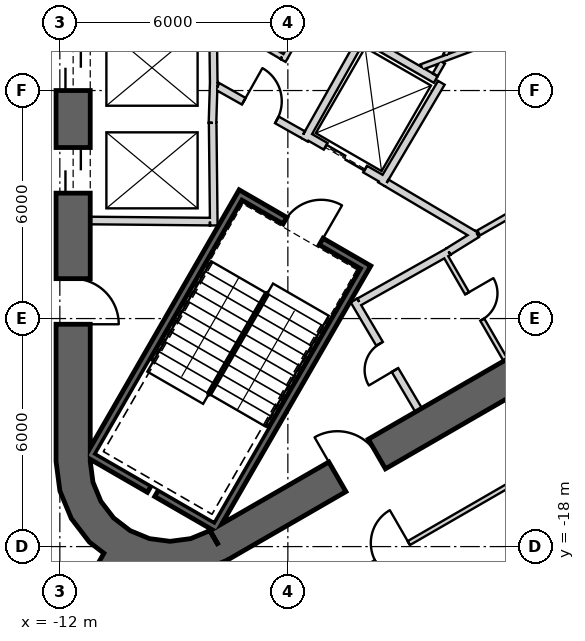
"""IFC4 building model, lengths in metres.
Left out: names, types, materials, properties, quantities, classifications, styles, units other than length and angle.
Written with IfcOpenShell. Run it as: python <this file> out.ifc"""

import sys

from ifc_helpers import new_model, si_unit, direction, frame, frame_2d, origin, place, context, subcontext, project, spatial, polyline, rectangle, outline, extrude, element, fill, save


model = new_model("IFC4")
c1 = context("Model", 3, precision=1e-05, world=origin(), true_north=direction((0.0, 1.0)))
c2 = subcontext(c1, "Body", "Model", "MODEL_VIEW")
j1 = project(units=[si_unit("LENGTHUNIT", "METRE"), si_unit("PLANEANGLEUNIT", "RADIAN")], contexts=[c1])
p1 = place(None, origin())
s1 = spatial("IfcSite", under=j1, at=p1, CompositionType="ELEMENT")
p2 = place(p1, origin())
s2 = spatial("IfcBuilding", under=s1, at=p2, CompositionType="ELEMENT")
p3 = place(p2, frame((0.0, 0.0, 357.2)))
s3 = spatial("IfcBuildingStorey", under=s2, at=p3, CompositionType="ELEMENT", Elevation=357.2)
p4 = place(p3, frame((-11.65, 15.762, 0.0), z_axis=(0.0, 0.0, 1.0), x_axis=(0.0, -1.0, 0.0)))
e1 = element("IfcWall", 1, at=p4, inside=s3, PredefinedType="SHEAR", context=c2, shape_type="SweptSolid", body=[
    extrude(rectangle(XDim=31.523, YDim=0.9, at=frame_2d((15.762, 0.0))), origin(), (0.0, 0.0, 1.0), 3.9),
])
p5 = place(p4, frame((7.062, 0.0, 0.0)))
e2 = element("IfcOpeningElement", 2, at=p5, cuts=e1, PredefinedType="OPENING", context=c2, shape_type="SweptSolid", body=[
    extrude(rectangle(XDim=1.2, YDim=2.4, at=frame_2d((0.6, 1.2))), frame((0.0, 0.46, 0.0), z_axis=(0.0, -1.0, 0.0), x_axis=(1.0, 0.0, 0.0)), (0.0, 0.0, 1.0), 0.92),
])
p6 = place(p4, frame((9.762, 0.0, 0.0)))
e3 = element("IfcOpeningElement", 3, at=p6, cuts=e1, PredefinedType="OPENING", context=c2, shape_type="SweptSolid", body=[
    extrude(rectangle(XDim=1.2, YDim=2.4, at=frame_2d((0.6, 1.2))), frame((0.0, 0.46, 0.0), z_axis=(0.0, -1.0, 0.0), x_axis=(1.0, 0.0, 0.0)), (0.0, 0.0, 1.0), 0.92),
])
p7 = place(p4, frame((12.462, 0.0, 0.0)))
e4 = element("IfcOpeningElement", 4, at=p7, cuts=e1, PredefinedType="OPENING", context=c2, shape_type="SweptSolid", body=[
    extrude(rectangle(XDim=1.2, YDim=2.4, at=frame_2d((0.6, 1.2))), frame((0.0, 0.46, 0.0), z_axis=(0.0, -1.0, 0.0), x_axis=(1.0, 0.0, 0.0)), (0.0, 0.0, 1.0), 0.92),
])
p8 = place(p4, frame((15.162, 0.0, 0.0)))
e5 = element("IfcOpeningElement", 5, at=p8, cuts=e1, PredefinedType="OPENING", context=c2, shape_type="SweptSolid", body=[
    extrude(rectangle(XDim=1.2, YDim=2.4, at=frame_2d((0.6, 1.2))), frame((0.0, 0.46, 0.0), z_axis=(0.0, -1.0, 0.0), x_axis=(1.0, 0.0, 0.0)), (0.0, 0.0, 1.0), 0.92),
])
p9 = place(p4, frame((17.862, 0.0, 0.0)))
e6 = element("IfcOpeningElement", 6, at=p9, cuts=e1, PredefinedType="OPENING", context=c2, shape_type="SweptSolid", body=[
    extrude(rectangle(XDim=1.2, YDim=2.4, at=frame_2d((0.6, 1.2))), frame((0.0, 0.46, 0.0), z_axis=(0.0, -1.0, 0.0), x_axis=(1.0, 0.0, 0.0)), (0.0, 0.0, 1.0), 0.92),
])
p10 = place(p4, frame((20.562, 0.0, 0.0)))
e7 = element("IfcOpeningElement", 7, at=p10, cuts=e1, PredefinedType="OPENING", context=c2, shape_type="SweptSolid", body=[
    extrude(rectangle(XDim=1.2, YDim=2.4, at=frame_2d((0.6, 1.2))), frame((0.0, 0.46, 0.0), z_axis=(0.0, -1.0, 0.0), x_axis=(1.0, 0.0, 0.0)), (0.0, 0.0, 1.0), 0.92),
])
p11 = place(p4, frame((23.262, 0.0, 0.0)))
e8 = element("IfcOpeningElement", 8, at=p11, cuts=e1, PredefinedType="OPENING", context=c2, shape_type="SweptSolid", body=[
    extrude(rectangle(XDim=1.2, YDim=2.4, at=frame_2d((0.6, 1.2))), frame((0.0, 0.46, 0.0), z_axis=(0.0, -1.0, 0.0), x_axis=(1.0, 0.0, 0.0)), (0.0, 0.0, 1.0), 0.92),
])
p12 = place(p4, frame((3.612, 0.0, 0.0)))
e9 = element("IfcOpeningElement", 9, at=p12, cuts=e1, PredefinedType="OPENING", context=c2, shape_type="SweptSolid", body=[
    extrude(rectangle(XDim=1.2, YDim=2.4, at=frame_2d((0.6, 1.2))), frame((0.0, 0.46, 0.0), z_axis=(0.0, -1.0, 0.0), x_axis=(1.0, 0.0, 0.0)), (0.0, 0.0, 1.0), 0.92),
])
p13 = place(p4, frame((26.712, 0.0, 0.0)))
e10 = element("IfcOpeningElement", 10, at=p13, cuts=e1, PredefinedType="OPENING", context=c2, shape_type="SweptSolid", body=[
    extrude(rectangle(XDim=1.2, YDim=2.4, at=frame_2d((0.6, 1.2))), frame((0.0, 0.46, 0.0), z_axis=(0.0, -1.0, 0.0), x_axis=(1.0, 0.0, 0.0)), (0.0, 0.0, 1.0), 0.92),
])
p14 = place(p3, frame((-7.825, -17.97, 0.0), z_axis=(0.0, 0.0, 1.0), x_axis=(0.866028369851, 0.499994862586, 0.0)))
e11 = element("IfcWall", 11, at=p14, inside=s3, PredefinedType="SHEAR", context=c2, shape_type="SweptSolid", body=[
    extrude(rectangle(XDim=31.523, YDim=0.9, at=frame_2d((15.762, 0.0))), origin(), (0.0, 0.0, 1.0), 3.9),
])
p15 = place(p14, frame((17.862, 0.0, 0.0)))
e12 = element("IfcOpeningElement", 12, at=p15, cuts=e11, PredefinedType="OPENING", context=c2, shape_type="SweptSolid", body=[
    extrude(rectangle(XDim=1.2, YDim=2.4, at=frame_2d((0.6, 1.2))), frame((0.0, 0.46, 0.0), z_axis=(0.0, -1.0, 0.0), x_axis=(1.0, 0.0, 0.0)), (0.0, 0.0, 1.0), 0.92),
])
p16 = place(p14, frame((20.562, 0.0, 0.0)))
e13 = element("IfcOpeningElement", 13, at=p16, cuts=e11, PredefinedType="OPENING", context=c2, shape_type="SweptSolid", body=[
    extrude(rectangle(XDim=1.2, YDim=2.4, at=frame_2d((0.6, 1.2))), frame((0.0, 0.46, 0.0), z_axis=(0.0, -1.0, 0.0), x_axis=(1.0, 0.0, 0.0)), (0.0, 0.0, 1.0), 0.92),
])
p17 = place(p14, frame((26.712, 0.0, 0.0)))
e14 = element("IfcOpeningElement", 14, at=p17, cuts=e11, PredefinedType="OPENING", context=c2, shape_type="SweptSolid", body=[
    extrude(rectangle(XDim=1.2, YDim=2.4, at=frame_2d((0.6, 1.2))), frame((0.0, 0.46, 0.0), z_axis=(0.0, -1.0, 0.0), x_axis=(1.0, 0.0, 0.0)), (0.0, 0.0, 1.0), 0.92),
])
p18 = place(p14, frame((3.612, 0.0, 0.0)))
e15 = element("IfcOpeningElement", 15, at=p18, cuts=e11, PredefinedType="OPENING", context=c2, shape_type="SweptSolid", body=[
    extrude(rectangle(XDim=1.2, YDim=2.4, at=frame_2d((0.6, 1.2))), frame((0.0, 0.46, 0.0), z_axis=(0.0, -1.0, 0.0), x_axis=(1.0, 0.0, 0.0)), (0.0, 0.0, 1.0), 0.92),
])
p19 = place(p3, origin())
e16 = element("IfcWall", 16, at=p19, inside=s3, PredefinedType="SHEAR", context=c2, shape_type="SweptSolid", body=[
    extrude(outline(polyline([(-12.1, -15.762), (-11.998, -16.538), (-11.698, -17.262), (-11.221, -17.883), (-10.6, -18.36), (-9.876, -18.659), (-9.1, -18.762), (-8.323, -18.659), (-7.6, -18.36), (-8.05, -17.58), (-8.556, -17.79), (-9.1, -17.862), (-9.644, -17.79), (-10.15, -17.58), (-10.585, -17.247), (-10.919, -16.812), (-11.128, -16.305), (-11.2, -15.762), (-12.1, -15.762)])), origin(), (0.0, 0.0, 1.0), 3.9),
])
p20 = place(p3, frame((-10.575, -18.316, 0.0), z_axis=(0.0, 0.0, 1.0), x_axis=(-0.500009454961, -0.866019944892, 0.0)))
e17 = element("IfcWall", 17, at=p20, inside=s3, PredefinedType="SHEAR", context=c2, shape_type="SweptSolid", body=[
    extrude(rectangle(XDim=7.388, YDim=0.6, at=frame_2d((3.694, 0.0))), origin(), (0.0, 0.0, 1.0), 3.9),
])
p21 = place(p20, frame((1.4, 0.0, 0.0)))
e18 = element("IfcOpeningElement", 18, at=p21, cuts=e17, PredefinedType="OPENING", context=c2, shape_type="SweptSolid", body=[
    extrude(rectangle(XDim=1.4, YDim=2.4, at=frame_2d((0.7, 1.2))), frame((0.0, 0.31, 0.0), z_axis=(0.0, -1.0, 0.0), x_axis=(1.0, 0.0, 0.0)), (0.0, 0.0, 1.0), 0.62),
])
p22 = place(p3, frame((-7.95, -5.772, 0.0), z_axis=(0.0, 0.0, 1.0), x_axis=(-0.030803413295, -0.999525462272, 0.0)))
e19 = element("IfcWall", 19, at=p22, inside=s3, PredefinedType="PLUMBINGWALL", context=c2, shape_type="SweptSolid", body=[
    extrude(rectangle(XDim=1.078, YDim=0.2, at=frame_2d((0.539, 0.0))), origin(), (0.0, 0.0, 1.0), 3.6),
])
p23 = place(p3, frame((-7.971, -4.05, 0.0), z_axis=(0.0, 0.0, 1.0), x_axis=(0.012042535896, -0.999927486035, 0.0)))
e20 = element("IfcWall", 20, at=p23, inside=s3, PredefinedType="PLUMBINGWALL", context=c2, shape_type="SweptSolid", body=[
    extrude(rectangle(XDim=1.845, YDim=0.2, at=frame_2d((0.922, 0.0))), origin(), (0.0, 0.0, 1.0), 3.6),
])
p24 = place(p3, frame((-7.979, -6.85, 0.0), z_axis=(0.0, 0.0, 1.0), x_axis=(0.011121475088, -0.999938154483, 0.0)))
e21 = element("IfcWall", 21, at=p24, inside=s3, PredefinedType="PLUMBINGWALL", context=c2, shape_type="SweptSolid", body=[
    extrude(rectangle(XDim=2.7, YDim=0.2, at=frame_2d((1.35, 0.0))), origin(), (0.0, 0.0, 1.0), 3.6),
])
p25 = place(p3, frame((-8.05, -9.449, 0.0), z_axis=(0.0, 0.0, 1.0), x_axis=(-0.999957467379, 0.009222983926, 0.0)))
e22 = element("IfcWall", 22, at=p25, inside=s3, PredefinedType="PLUMBINGWALL", context=c2, shape_type="SweptSolid", body=[
    extrude(rectangle(XDim=3.15, YDim=0.2, at=frame_2d((1.575, 0.0))), origin(), (0.0, 0.0, 1.0), 3.6),
])
p26 = place(p3, frame((-3.905, -10.563, -0.3), z_axis=(0.0, 0.0, 1.0), x_axis=(-0.500012932018, -0.866017937352, 0.0)))
e23 = element("IfcWall", 23, at=p26, inside=s3, PredefinedType="SHEAR", context=c2, shape_type="SweptSolid", body=[
    extrude(rectangle(XDim=8.1, YDim=0.2, at=frame_2d((4.05, 0.0))), origin(), (0.0, 0.0, 1.0), 3.9),
])
p27 = place(p3, frame((-11.282, -15.541, -0.3), z_axis=(0.0, 0.0, 1.0), x_axis=(0.866000483506, -0.500043160704, 0.0)))
e24 = element("IfcWall", 24, at=p27, inside=s3, PredefinedType="SHEAR", context=c2, shape_type="SweptSolid", body=[
    extrude(rectangle(XDim=3.8, YDim=0.2, at=frame_2d((1.9, 0.0))), origin(), (0.0, 0.0, 1.0), 3.9),
])
p28 = place(p3, frame((-7.196, -8.663, -0.3), z_axis=(0.0, 0.0, 1.0), x_axis=(-0.499997992926, -0.866026562566, 0.0)))
e25 = element("IfcWall", 25, at=p28, inside=s3, PredefinedType="SHEAR", context=c2, shape_type="SweptSolid", body=[
    extrude(rectangle(XDim=7.9, YDim=0.2, at=frame_2d((3.95, 0.0))), origin(), (0.0, 0.0, 1.0), 3.9),
])
p29 = place(p3, frame((-4.041, -10.599, -0.3), z_axis=(0.0, 0.0, 1.0), x_axis=(-0.866047807691, 0.499961193289, 0.0)))
e26 = element("IfcWall", 26, at=p29, inside=s3, PredefinedType="SHEAR", context=c2, shape_type="SweptSolid", body=[
    extrude(rectangle(XDim=3.6, YDim=0.2, at=frame_2d((1.8, 0.0))), origin(), (0.0, 0.0, 1.0), 3.9),
])
p30 = place(p29, frame((1.25, 0.0, 0.3)))
e27 = element("IfcOpeningElement", 27, at=p30, cuts=e26, PredefinedType="OPENING", context=c2, shape_type="SweptSolid", body=[
    extrude(rectangle(XDim=1.1, YDim=2.1, at=frame_2d((0.55, 1.05))), frame((0.0, 0.11, 0.0), z_axis=(0.0, -1.0, 0.0), x_axis=(1.0, 0.0, 0.0)), (0.0, 0.0, 1.0), 0.22),
])
p31 = place(p3, frame((-3.446, -8.368, 0.0), z_axis=(0.0, 0.0, 1.0), x_axis=(-0.866024647952, 0.500001309137, 0.0)))
e28 = element("IfcWall", 28, at=p31, inside=s3, PredefinedType="PLUMBINGWALL", context=c2, shape_type="SweptSolid", body=[
    extrude(rectangle(XDim=2.4, YDim=0.2, at=frame_2d((1.2, 0.0))), origin(), (0.0, 0.0, 1.0), 3.6),
])
p32 = place(p31, frame((0.6, 0.0, 0.0)))
e29 = element("IfcOpeningElement", 29, at=p32, cuts=e28, PredefinedType="OPENING", context=c2, shape_type="SweptSolid", body=[
    extrude(rectangle(XDim=1.2, YDim=2.4, at=frame_2d((0.6, 1.2))), frame((0.0, 0.11, 0.0), z_axis=(0.0, -1.0, 0.0), x_axis=(1.0, 0.0, 0.0)), (0.0, 0.0, 1.0), 0.22),
])
p33 = place(p3, frame((-1.961, -5.796, 0.0), z_axis=(0.0, 0.0, 1.0), x_axis=(-0.508647062354, -0.860975125052, 0.0)))
e30 = element("IfcWall", 30, at=p33, inside=s3, PredefinedType="PLUMBINGWALL", context=c2, shape_type="SweptSolid", body=[
    extrude(rectangle(XDim=3.1, YDim=0.2, at=frame_2d((1.55, 0.0))), origin(), (0.0, 0.0, 1.0), 3.6),
])
p34 = place(p3, frame((-3.99, -4.509, 0.0), z_axis=(0.0, 0.0, 1.0), x_axis=(-0.491358283181, -0.870957540612, 0.0)))
e31 = element("IfcWall", 31, at=p34, inside=s3, PredefinedType="PLUMBINGWALL", context=c2, shape_type="SweptSolid", body=[
    extrude(rectangle(XDim=3.2, YDim=0.2, at=frame_2d((1.6, 0.0))), origin(), (0.0, 0.0, 1.0), 3.6),
])
p35 = place(p3, frame((-3.953, -4.646, 0.0), z_axis=(0.0, 0.0, 1.0), x_axis=(0.866065302921, -0.4999308863, 0.0)))
e32 = element("IfcWall", 32, at=p35, inside=s3, PredefinedType="PLUMBINGWALL", context=c2, shape_type="SweptSolid", body=[
    extrude(rectangle(XDim=2.264, YDim=0.2, at=frame_2d((1.132, 0.0))), origin(), (0.0, 0.0, 1.0), 3.6),
])
p36 = place(p3, frame((-4.26, -11.524, 0.0), z_axis=(0.0, 0.0, 1.0), x_axis=(0.507997497166, -0.861358544901, 0.0)))
e33 = element("IfcWall", 33, at=p36, inside=s3, PredefinedType="PARTITIONING", context=c2, shape_type="SweptSolid", body=[
    extrude(rectangle(XDim=3.35, YDim=0.2, at=frame_2d((1.675, 0.0))), origin(), (0.0, 0.0, 1.0), 3.6),
])
p37 = place(p3, frame((-1.024, -9.771, 0.0), z_axis=(0.0, 0.0, 1.0), x_axis=(-0.866029903013, -0.499992207027, 0.0)))
e34 = element("IfcWall", 34, at=p37, inside=s3, PredefinedType="PARTITIONING", context=c2, shape_type="SweptSolid", body=[
    extrude(rectangle(XDim=3.578, YDim=0.2, at=frame_2d((1.789, 0.0))), origin(), (0.0, 0.0, 1.0), 3.6),
])
p38 = place(p37, frame((1.389, 0.0, 0.0)))
e35 = element("IfcOpeningElement", 35, at=p38, cuts=e34, PredefinedType="OPENING", context=c2, shape_type="SweptSolid", body=[
    extrude(rectangle(XDim=0.8, YDim=2.1, at=frame_2d((0.4, 1.05))), frame((0.0, 0.11, 0.0), z_axis=(0.0, -1.0, 0.0), x_axis=(1.0, 0.0, 0.0)), (0.0, 0.0, 1.0), 0.22),
])
p39 = place(p3, frame((-1.023, -9.772, 0.0), z_axis=(0.0, 0.0, 1.0), x_axis=(0.874290944206, 0.485402250592, 0.0)))
e36 = element("IfcWall", 36, at=p39, inside=s3, PredefinedType="PARTITIONING", context=c2, shape_type="SweptSolid", body=[
    extrude(rectangle(XDim=1.723, YDim=0.12, at=frame_2d((0.861, 0.0))), origin(), (0.0, 0.0, 1.0), 3.6),
])
p40 = place(p3, frame((-3.401, -8.43, 0.0), z_axis=(0.0, 0.0, 1.0), x_axis=(0.860630814782, -0.509229418482, 0.0)))
e37 = element("IfcWall", 37, at=p40, inside=s3, PredefinedType="PARTITIONING", context=c2, shape_type="SweptSolid", body=[
    extrude(rectangle(XDim=2.582, YDim=0.2, at=frame_2d((1.291, 0.0))), origin(), (0.0, 0.0, 1.0), 3.6),
])
p41 = place(p3, frame((-7.849, -5.894, 0.0), z_axis=(0.0, 0.0, 1.0), x_axis=(0.871363259478, -0.490638431059, 0.0)))
e38 = element("IfcWall", 38, at=p41, inside=s3, PredefinedType="PARTITIONING", context=c2, shape_type="SweptSolid", body=[
    extrude(rectangle(XDim=2.581, YDim=0.2, at=frame_2d((1.291, 0.0))), origin(), (0.0, 0.0, 1.0), 3.6),
])
p42 = place(p41, frame((0.791, 0.0, 0.0)))
e39 = element("IfcOpeningElement", 39, at=p42, cuts=e38, PredefinedType="OPENING", context=c2, shape_type="SweptSolid", body=[
    extrude(rectangle(XDim=1.0, YDim=2.1, at=frame_2d((0.5, 1.05))), frame((0.0, 0.11, 0.0), z_axis=(0.0, -1.0, 0.0), x_axis=(1.0, 0.0, 0.0)), (0.0, 0.0, 1.0), 0.22),
])
p43 = place(p3, frame((0.224, -1.761, 0.0), z_axis=(0.0, 0.0, 1.0), x_axis=(-0.494327216836, -0.869275907118, 0.0)))
e40 = element("IfcWall", 40, at=p43, inside=s3, PredefinedType="PARTITIONING", context=c2, shape_type="SweptSolid", body=[
    extrude(rectangle(XDim=4.487, YDim=0.12, at=frame_2d((2.244, 0.0))), origin(), (0.0, 0.0, 1.0), 3.6),
])
p44 = place(p43, frame((1.895, 0.0, 0.0)))
e41 = element("IfcOpeningElement", 41, at=p44, cuts=e40, PredefinedType="OPENING", context=c2, shape_type="SweptSolid", body=[
    extrude(rectangle(XDim=0.8, YDim=2.1, at=frame_2d((0.4, 1.05))), frame((0.0, 0.07, 0.0), z_axis=(0.0, -1.0, 0.0), x_axis=(1.0, 0.0, 0.0)), (0.0, 0.0, 1.0), 0.14),
])
p45 = place(p3, frame((-6.118, -5.197, 0.0), z_axis=(0.0, 0.0, 1.0), x_axis=(0.499990139034, 0.866031096941, 0.0)))
e42 = element("IfcWall", 42, at=p45, inside=s3, PredefinedType="PARTITIONING", context=c2, shape_type="SweptSolid", body=[
    extrude(rectangle(XDim=3.0, YDim=0.12, at=frame_2d((1.5, 0.0))), origin(), (0.0, 0.0, 1.0), 3.6),
])
p46 = place(p3, frame((-7.95, -4.041, 0.0), z_axis=(0.0, 0.0, 1.0), x_axis=(0.860112457103, -0.510104461004, 0.0)))
e43 = element("IfcWall", 43, at=p46, inside=s3, PredefinedType="PARTITIONING", context=c2, shape_type="SweptSolid", body=[
    extrude(rectangle(XDim=2.104, YDim=0.12, at=frame_2d((1.052, 0.0))), origin(), (0.0, 0.0, 1.0), 3.6),
])
p47 = place(p3, frame((-6.505, -21.885, 0.0), z_axis=(0.0, 0.0, 1.0), x_axis=(0.866023249944, 0.500003730543, 0.0)))
e44 = element("IfcWall", 44, at=p47, inside=s3, PredefinedType="PARTITIONING", context=c2, shape_type="SweptSolid", body=[
    extrude(rectangle(XDim=9.016, YDim=0.2, at=frame_2d((4.508, 0.0))), origin(), (0.0, 0.0, 1.0), 2.97),
])
p48 = place(p47, frame((4.049, 0.0, 0.0)))
e45 = element("IfcOpeningElement", 45, at=p48, cuts=e44, PredefinedType="OPENING", context=c2, shape_type="SweptSolid", body=[
    extrude(rectangle(XDim=1.0, YDim=2.1, at=frame_2d((0.5, 1.05))), frame((0.0, 0.11, 0.0), z_axis=(0.0, -1.0, 0.0), x_axis=(1.0, 0.0, 0.0)), (0.0, 0.0, 1.0), 0.22),
])
p49 = place(p30, origin())
e46 = element("IfcDoor", 46, at=p49, inside=s3, OperationType="SINGLE_SWING_RIGHT", PredefinedType="USERDEFINED", context=c2, shape_type="SweptSolid", body=[
    extrude(rectangle(XDim=1.1, YDim=2.1, at=frame_2d((0.55, 1.05))), frame((0.0, 0.025, 0.0), z_axis=(0.0, -1.0, 0.0), x_axis=(1.0, 0.0, 0.0)), (0.0, 0.0, 1.0), 0.05),
])
fill(e27, e46)
p50 = place(p42, origin())
e47 = element("IfcDoor", 47, at=p50, inside=s3, OperationType="SINGLE_SWING_LEFT", PredefinedType="USERDEFINED", context=c2, shape_type="SweptSolid", body=[
    extrude(rectangle(XDim=1.0, YDim=2.1, at=frame_2d((0.5, 1.05))), frame((0.0, 0.025, 0.0), z_axis=(0.0, -1.0, 0.0), x_axis=(1.0, 0.0, 0.0)), (0.0, 0.0, 1.0), 0.05),
])
fill(e39, e47)
p51 = place(p32, origin())
e48 = element("IfcDoor", 48, at=p51, inside=s3, OperationType="SLIDING_TO_LEFT", PredefinedType="USERDEFINED", context=c2, shape_type="SweptSolid", body=[
    extrude(rectangle(XDim=1.2, YDim=2.4, at=frame_2d((0.6, 1.2))), frame((0.0, 0.025, 0.0), z_axis=(0.0, -1.0, 0.0), x_axis=(1.0, 0.0, 0.0)), (0.0, 0.0, 1.0), 0.05),
])
fill(e29, e48)
p52 = place(p38, origin())
e49 = element("IfcDoor", 49, at=p52, inside=s3, OperationType="SINGLE_SWING_RIGHT", PredefinedType="USERDEFINED", context=c2, shape_type="SweptSolid", body=[
    extrude(rectangle(XDim=0.8, YDim=2.1, at=frame_2d((0.4, 1.05))), frame((0.0, 0.025, 0.0), z_axis=(0.0, -1.0, 0.0), x_axis=(1.0, 0.0, 0.0)), (0.0, 0.0, 1.0), 0.05),
])
fill(e35, e49)
p53 = place(p10, origin())
e50 = element("IfcDoor", 50, at=p53, inside=s3, OperationType="SLIDING_TO_LEFT", PredefinedType="USERDEFINED", context=c2, shape_type="SweptSolid", body=[
    extrude(rectangle(XDim=1.2, YDim=2.4, at=frame_2d((0.6, 1.2))), frame((0.0, 0.025, 0.0), z_axis=(0.0, -1.0, 0.0), x_axis=(1.0, 0.0, 0.0)), (0.0, 0.0, 1.0), 0.05),
])
fill(e7, e50)
p54 = place(p11, origin())
e51 = element("IfcDoor", 51, at=p54, inside=s3, OperationType="SLIDING_TO_LEFT", PredefinedType="USERDEFINED", context=c2, shape_type="SweptSolid", body=[
    extrude(rectangle(XDim=1.2, YDim=2.4, at=frame_2d((0.6, 1.2))), frame((0.0, 0.025, 0.0), z_axis=(0.0, -1.0, 0.0), x_axis=(1.0, 0.0, 0.0)), (0.0, 0.0, 1.0), 0.05),
])
fill(e8, e51)
p55 = place(p13, origin())
e52 = element("IfcDoor", 52, at=p55, inside=s3, OperationType="SINGLE_SWING_LEFT", PredefinedType="USERDEFINED", context=c2, shape_type="SweptSolid", body=[
    extrude(rectangle(XDim=1.2, YDim=2.4, at=frame_2d((0.6, 1.2))), frame((0.0, 0.025, 0.0), z_axis=(0.0, -1.0, 0.0), x_axis=(1.0, 0.0, 0.0)), (0.0, 0.0, 1.0), 0.05),
])
fill(e10, e52)
p56 = place(p18, origin())
e53 = element("IfcDoor", 53, at=p56, inside=s3, OperationType="SINGLE_SWING_RIGHT", PredefinedType="USERDEFINED", context=c2, shape_type="SweptSolid", body=[
    extrude(rectangle(XDim=1.2, YDim=2.4, at=frame_2d((0.6, 1.2))), frame((0.0, 0.025, 0.0), z_axis=(0.0, -1.0, 0.0), x_axis=(1.0, 0.0, 0.0)), (0.0, 0.0, 1.0), 0.05),
])
fill(e15, e53)
save(model, sys.argv[1])
